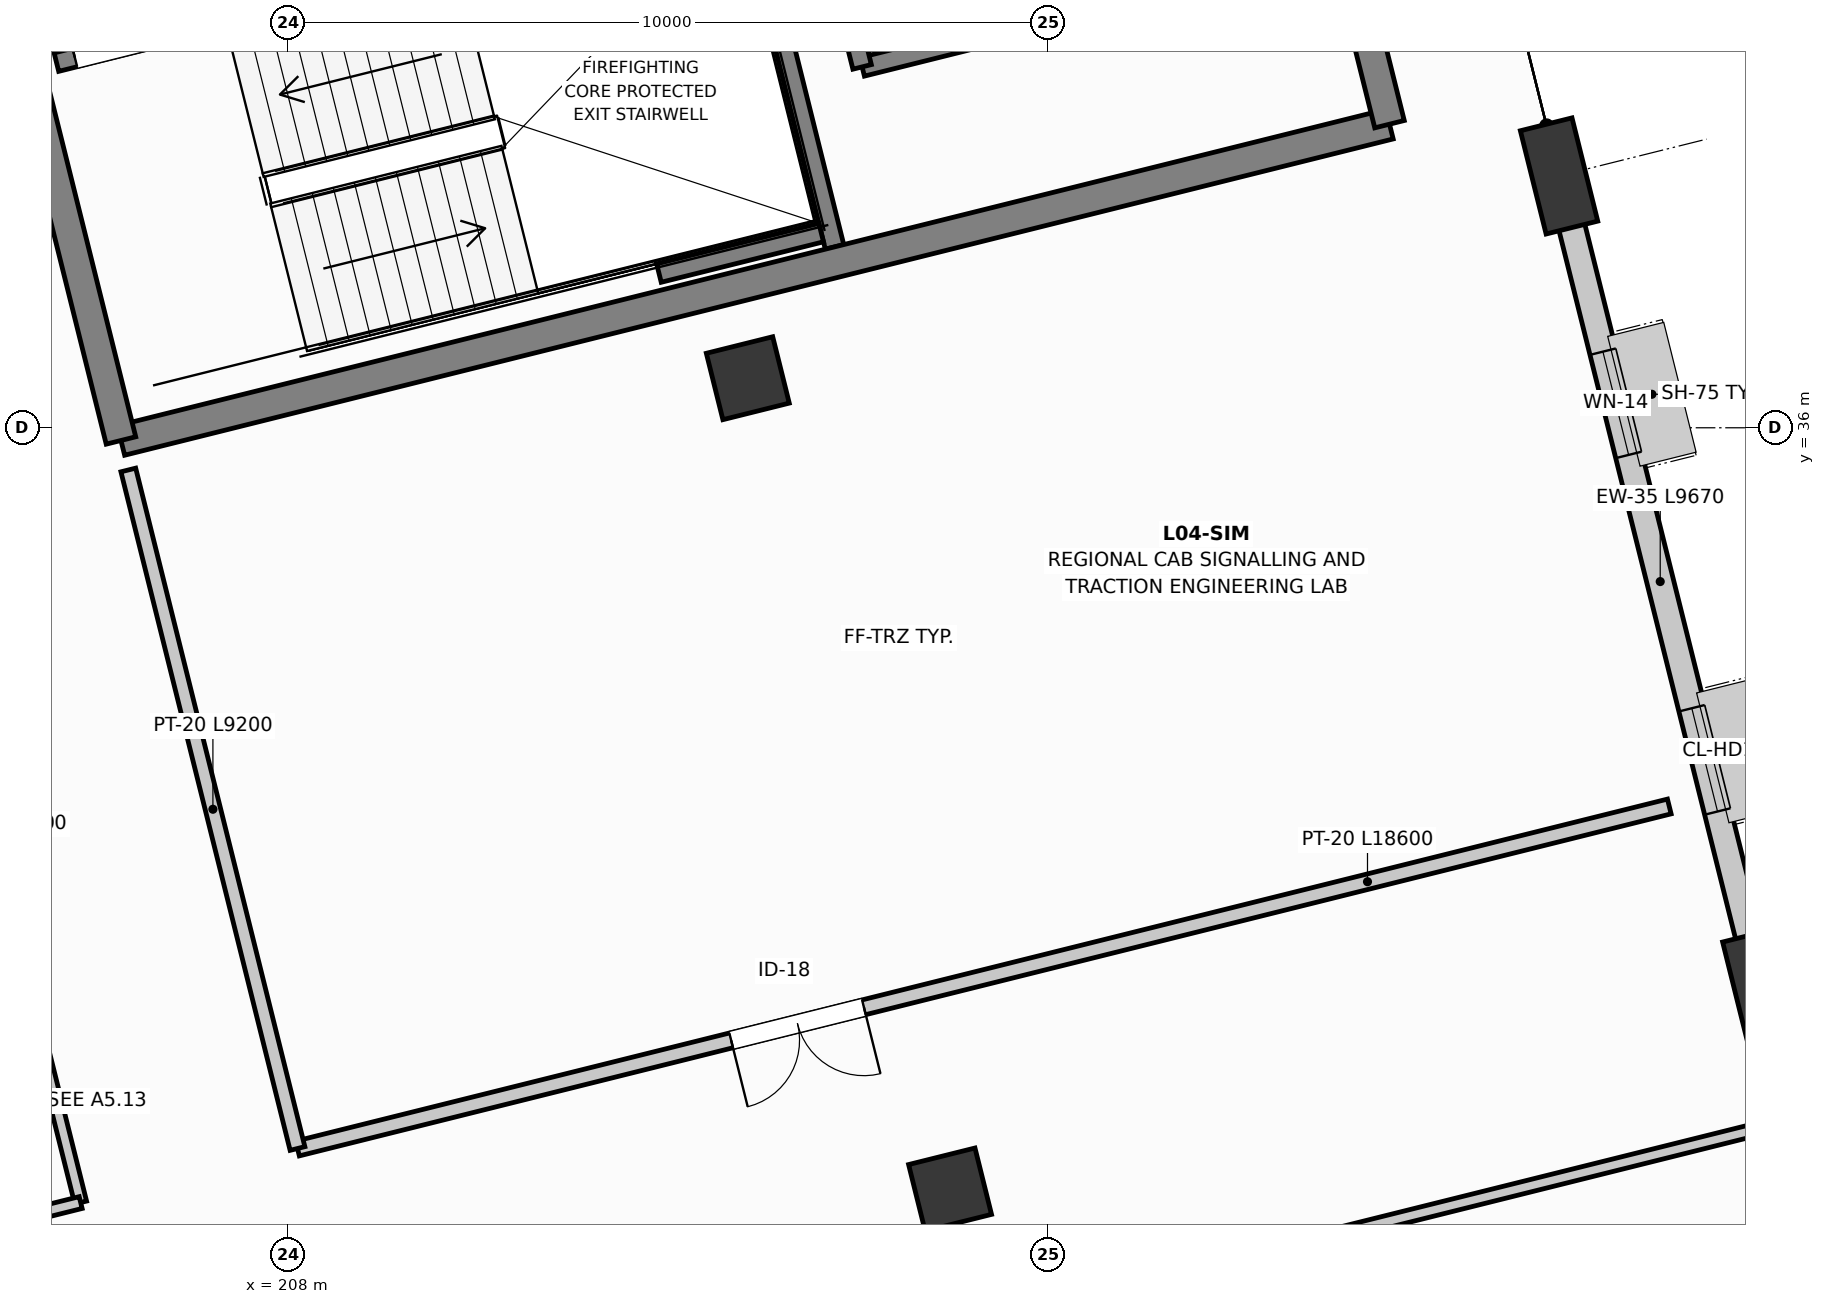
"""IFC4 building model, lengths in metres.
Left out: names, types, materials, properties, quantities, classifications, styles, units other than length and angle.
Written with IfcOpenShell. Run it as: python <this file> out.ifc"""

import sys

from ifc_helpers import new_model, si_unit, direction, frame, frame_2d, origin, origin_2d, place, context, subcontext, project, spatial, rectangle, extrude, element, fill, save


model = new_model("IFC4")
c1 = context("Model", 3, precision=1e-05, world=origin(), true_north=direction((0.0, 1.0)))
c2 = subcontext(c1, "Body", "Model", "MODEL_VIEW")
j1 = project(units=[si_unit("LENGTHUNIT", "METRE"), si_unit("PLANEANGLEUNIT", "RADIAN")], contexts=[c1])
p1 = place(None, origin())
s1 = spatial("IfcSite", under=j1, at=p1, CompositionType="ELEMENT")
p2 = place(p1, origin())
s2 = spatial("IfcBuilding", under=s1, at=p2, CompositionType="ELEMENT")
p3 = place(p2, frame((0.0, 0.0, 20.4)))
s3 = spatial("IfcBuildingStorey", under=s2, at=p3, CompositionType="ELEMENT", Elevation=20.4)
for number, where, z_axis, x_axis in (
    (1, (216.705, 25.979, 0.0), (0.0, 0.0, 1.0), (0.97, 0.242, 0.0)),
    (2, (214.044, 36.652, 0.0), (0.0, 0.0, 1.0), (0.97, 0.242, 0.0)),
):
    element("IfcColumn", number, at=place(p3, frame(where, z_axis=z_axis, x_axis=x_axis)), inside=s3, PredefinedType="COLUMN", context=c2, shape_type="SweptSolid", body=[
        extrude(rectangle(XDim=0.9, YDim=0.9, at=origin_2d()), origin(), (0.0, 0.0, 1.0), 4.2),
    ])
for number, where, z_axis, x_axis in (
    (3, (227.378, 28.64, 0.0), (0.0, 0.0, 1.0), (0.97, 0.242, 0.0)),
    (4, (224.717, 39.313, 0.0), (0.0, 0.0, 1.0), (0.97, 0.242, 0.0)),
):
    element("IfcColumn", number, at=place(p3, frame(where, z_axis=z_axis, x_axis=x_axis)), inside=s3, PredefinedType="COLUMN", context=c2, shape_type="SweptSolid", body=[
        extrude(rectangle(XDim=0.7, YDim=1.4, at=origin_2d()), origin(), (0.0, 0.0, 1.0), 4.2),
    ])
p4 = place(p3, frame((227.218, 29.285, 0.0), z_axis=(0.0, 0.0, 1.0), x_axis=(-0.241919949636, 0.970296211457, 0.0)))
e5 = element("IfcWall", 5, at=p4, inside=s3, PredefinedType="STANDARD", context=c2, shape_type="SweptSolid", body=[
    extrude(rectangle(XDim=9.67, YDim=0.35, at=frame_2d((4.835, 0.0))), origin(), (0.0, 0.0, 1.0), 2.65),
])
p5 = place(p4, frame((1.717, 0.0, 0.85)))
e6 = element("IfcOpeningElement", 6, at=p5, cuts=e5, PredefinedType="OPENING", context=c2, shape_type="SweptSolid", body=[
    extrude(rectangle(XDim=1.4, YDim=1.5, at=frame_2d((0.7, 0.75))), frame((0.0, 0.185, 0.0), z_axis=(0.0, -1.0, 0.0), x_axis=(1.0, 0.0, 0.0)), (0.0, 0.0, 1.0), 0.37),
])
p6 = place(p4, frame((6.552, 0.0, 0.85)))
e7 = element("IfcOpeningElement", 7, at=p6, cuts=e5, PredefinedType="OPENING", context=c2, shape_type="SweptSolid", body=[
    extrude(rectangle(XDim=1.4, YDim=1.5, at=frame_2d((0.7, 0.75))), frame((0.0, 0.185, 0.0), z_axis=(0.0, -1.0, 0.0), x_axis=(1.0, 0.0, 0.0)), (0.0, 0.0, 1.0), 0.37),
])
p7 = place(p3, frame((215.548, 40.748, 0.0), z_axis=(0.0, 0.0, 1.0), x_axis=(0.97029284861, 0.241933436994, 0.0)))
e8 = element("IfcWall", 8, at=p7, inside=s3, PredefinedType="SOLIDWALL", context=c2, shape_type="SweptSolid", body=[
    extrude(rectangle(XDim=2.54, YDim=0.25, at=frame_2d((1.27, 0.0))), origin(), (0.0, 0.0, 1.0), 3.88),
])
p8 = place(p3, frame((214.909, 43.309, 0.0), z_axis=(0.0, 0.0, 1.0), x_axis=(0.241938414856, -0.970291607413, 0.0)))
e9 = element("IfcWall", 9, at=p8, inside=s3, PredefinedType="SOLIDWALL", context=c2, shape_type="SweptSolid", body=[
    extrude(rectangle(XDim=2.64, YDim=0.25, at=frame_2d((1.32, 0.0))), origin(), (0.0, 0.0, 1.0), 3.88),
])
p9 = place(p3, frame((204.948, 40.81, 0.0), z_axis=(0.0, 0.0, 1.0), x_axis=(0.970297151331, 0.241916179943, 0.0)))
e10 = element("IfcWall", 10, at=p9, inside=s3, PredefinedType="SOLIDWALL", context=c2, shape_type="SweptSolid", body=[
    extrude(rectangle(XDim=9.345, YDim=0.25, at=frame_2d((4.673, 0.0))), origin(), (0.0, 0.0, 1.0), 3.85),
])
p10 = place(p9, frame((0.25, 0.0, 0.0)))
e11 = element("IfcOpeningElement", 11, at=p10, cuts=e10, PredefinedType="OPENING", context=c2, shape_type="SweptSolid", body=[
    extrude(rectangle(XDim=1.8, YDim=2.25, at=frame_2d((0.9, 1.125))), frame((0.0, 0.135, 0.0), z_axis=(0.0, -1.0, 0.0), x_axis=(1.0, 0.0, 0.0)), (0.0, 0.0, 1.0), 0.27),
])
p11 = place(p3, frame((215.185, 38.38, 0.0), z_axis=(0.0, 0.0, 1.0), x_axis=(-0.241911120435, 0.970298412763, 0.0)))
e12 = element("IfcWall", 12, at=p11, inside=s3, PredefinedType="SOLIDWALL", context=c2, shape_type="SweptSolid", body=[
    extrude(rectangle(XDim=4.71, YDim=0.25, at=frame_2d((2.355, 0.0))), origin(), (0.0, 0.0, 1.0), 3.85),
])
p12 = place(p3, frame((212.875, 38.035, 0.0), z_axis=(0.0, 0.0, 1.0), x_axis=(0.97029738597, 0.241915238833, 0.0)))
e13 = element("IfcWall", 13, at=p12, inside=s3, PredefinedType="SOLIDWALL", context=c2, shape_type="SweptSolid", body=[
    extrude(rectangle(XDim=2.2, YDim=0.25, at=frame_2d((1.1, 0.0))), origin(), (0.0, 0.0, 1.0), 3.85),
])
p13 = place(p3, frame((205.797, 35.833, 0.0), z_axis=(0.0, 0.0, 1.0), x_axis=(0.970295179998, 0.241924086589, 0.0)))
e14 = element("IfcWall", 14, at=p13, inside=s3, PredefinedType="SHEAR", context=c2, shape_type="SweptSolid", body=[
    extrude(rectangle(XDim=17.2, YDim=0.4, at=frame_2d((8.6, 0.0))), origin(), (0.0, 0.0, 1.0), 3.88),
])
p14 = place(p3, frame((222.486, 39.994, 0.0), z_axis=(0.0, 0.0, 1.0), x_axis=(-0.241923808098, 0.970295249435, 0.0)))
e15 = element("IfcWall", 15, at=p14, inside=s3, PredefinedType="SHEAR", context=c2, shape_type="SweptSolid", body=[
    extrude(rectangle(XDim=9.0, YDim=0.4, at=frame_2d((4.5, 0.0))), origin(), (0.0, 0.0, 1.0), 3.88),
])
p15 = place(p3, frame((203.62, 44.566, 0.0), z_axis=(0.0, 0.0, 1.0), x_axis=(0.241921199913, -0.97029589973, 0.0)))
e16 = element("IfcWall", 16, at=p15, inside=s3, PredefinedType="SHEAR", context=c2, shape_type="SweptSolid", body=[
    extrude(rectangle(XDim=9.0, YDim=0.4, at=frame_2d((4.5, 0.0))), origin(), (0.0, 0.0, 1.0), 3.88),
])
p16 = place(p3, frame((211.319, 22.781, 0.0), z_axis=(0.0, 0.0, 1.0), x_axis=(0.970296178232, 0.241920082897, 0.0)))
e17 = element("IfcWall", 17, at=p16, inside=s3, PredefinedType="PARTITIONING", context=c2, shape_type="SweptSolid", body=[
    extrude(rectangle(XDim=16.4, YDim=0.16, at=frame_2d((8.2, 0.0))), origin(), (0.0, 0.0, 1.0), 3.205),
])
p17 = place(p16, frame((5.355, 0.0, 0.0)))
e18 = element("IfcOpeningElement", 18, at=p17, cuts=e17, PredefinedType="OPENING", context=c2, shape_type="SweptSolid", body=[
    extrude(rectangle(XDim=1.1, YDim=2.2, at=frame_2d((0.55, 1.1))), frame((0.0, 0.09, 0.0), z_axis=(0.0, -1.0, 0.0), x_axis=(1.0, 0.0, 0.0)), (0.0, 0.0, 1.0), 0.18),
])
p18 = place(p3, frame((226.167, 31.018, 0.0), z_axis=(0.0, 0.0, 1.0), x_axis=(-0.97029632108, -0.241919509958, 0.0)))
e19 = element("IfcWall", 19, at=p18, inside=s3, PredefinedType="PARTITIONING", context=c2, shape_type="SweptSolid", body=[
    extrude(rectangle(XDim=18.6, YDim=0.2, at=frame_2d((9.3, 0.0))), origin(), (0.0, 0.0, 1.0), 2.645),
])
p19 = place(p18, frame((10.92, 0.0, 0.0)))
e20 = element("IfcOpeningElement", 20, at=p19, cuts=e19, PredefinedType="OPENING", context=c2, shape_type="SweptSolid", body=[
    extrude(rectangle(XDim=1.8, YDim=2.25, at=frame_2d((0.9, 1.125))), frame((0.0, 0.11, 0.0), z_axis=(0.0, -1.0, 0.0), x_axis=(1.0, 0.0, 0.0)), (0.0, 0.0, 1.0), 0.22),
])
p20 = place(p3, frame((208.12, 26.518, 0.0), z_axis=(0.0, 0.0, 1.0), x_axis=(-0.241924322663, 0.970295121138, 0.0)))
e21 = element("IfcWall", 21, at=p20, inside=s3, PredefinedType="PARTITIONING", context=c2, shape_type="SweptSolid", body=[
    extrude(rectangle(XDim=9.2, YDim=0.2, at=frame_2d((4.6, 0.0))), origin(), (0.0, 0.0, 1.0), 3.205),
])
p21 = place(p3, frame((203.332, 33.569, 0.0), z_axis=(0.0, 0.0, 1.0), x_axis=(0.241929683653, -0.970293784463, 0.0)))
e22 = element("IfcWall", 22, at=p21, inside=s3, PredefinedType="PARTITIONING", context=c2, shape_type="SweptSolid", body=[
    extrude(rectangle(XDim=8.0, YDim=0.16, at=frame_2d((4.0, 0.0))), origin(), (0.0, 0.0, 1.0), 3.245),
])
p22 = place(p3, frame((205.267, 25.807, 0.0), z_axis=(0.0, 0.0, 1.0), x_axis=(-0.970295074314, -0.241924510463, 0.0)))
e23 = element("IfcWall", 23, at=p22, inside=s3, PredefinedType="PARTITIONING", context=c2, shape_type="SweptSolid", body=[
    extrude(rectangle(XDim=32.46, YDim=0.16, at=frame_2d((16.23, 0.0))), origin(), (0.0, 0.0, 1.0), 2.645),
])
p23 = place(p22, frame((15.68, 0.0, 0.0)))
e24 = element("IfcOpeningElement", 24, at=p23, cuts=e23, PredefinedType="OPENING", context=c2, shape_type="SweptSolid", body=[
    extrude(rectangle(XDim=1.1, YDim=2.2, at=frame_2d((0.55, 1.1))), frame((0.0, 0.09, 0.0), z_axis=(0.0, -1.0, 0.0), x_axis=(1.0, 0.0, 0.0)), (0.0, 0.0, 1.0), 0.18),
])
p24 = place(p5, origin())
e25 = element("IfcWindow", 25, at=p24, inside=s3, PartitioningType="SINGLE_PANEL", PredefinedType="WINDOW", context=c2, shape_type="SweptSolid", body=[
    extrude(rectangle(XDim=1.4, YDim=1.5, at=frame_2d((0.7, 0.75))), frame((0.0, 0.03, 0.0), z_axis=(0.0, -1.0, 0.0), x_axis=(1.0, 0.0, 0.0)), (0.0, 0.0, 1.0), 0.06),
])
fill(e6, e25)
p25 = place(p6, origin())
e26 = element("IfcWindow", 26, at=p25, inside=s3, PartitioningType="SINGLE_PANEL", PredefinedType="WINDOW", context=c2, shape_type="SweptSolid", body=[
    extrude(rectangle(XDim=1.4, YDim=1.5, at=frame_2d((0.7, 0.75))), frame((0.0, 0.03, 0.0), z_axis=(0.0, -1.0, 0.0), x_axis=(1.0, 0.0, 0.0)), (0.0, 0.0, 1.0), 0.06),
])
fill(e7, e26)
p26 = place(p10, origin())
e27 = element("IfcDoor", 27, at=p26, inside=s3, OperationType="DOUBLE_DOOR_SINGLE_SWING", PredefinedType="DOOR", context=c2, shape_type="SweptSolid", body=[
    extrude(rectangle(XDim=1.8, YDim=2.25, at=frame_2d((0.9, 1.125))), frame((0.0, 0.025, 0.0), z_axis=(0.0, -1.0, 0.0), x_axis=(1.0, 0.0, 0.0)), (0.0, 0.0, 1.0), 0.05),
])
fill(e11, e27)
p27 = place(p19, origin())
e28 = element("IfcDoor", 28, at=p27, inside=s3, OperationType="DOUBLE_DOOR_SINGLE_SWING", PredefinedType="DOOR", context=c2, shape_type="SweptSolid", body=[
    extrude(rectangle(XDim=1.8, YDim=2.25, at=frame_2d((0.9, 1.125))), frame((0.0, 0.025, 0.0), z_axis=(0.0, -1.0, 0.0), x_axis=(1.0, 0.0, 0.0)), (0.0, 0.0, 1.0), 0.05),
])
fill(e20, e28)
save(model, sys.argv[1])
